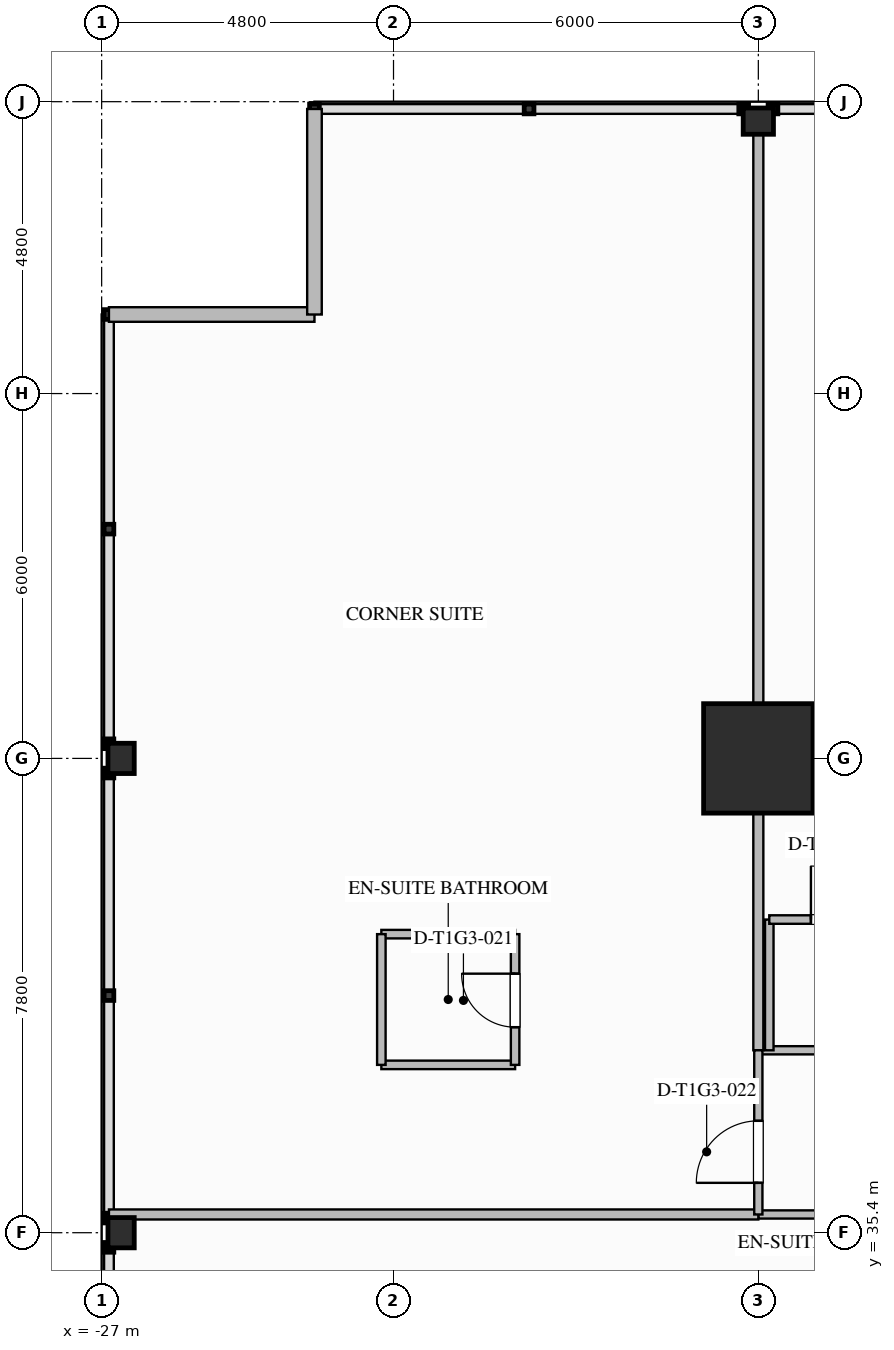
"""IFC4 building model, lengths in metres.
Left out: names, types, materials, properties, quantities, classifications, styles, units other than length and angle.
Written with IfcOpenShell. Run it as: python <this file> out.ifc"""

import sys

from ifc_helpers import new_model, si_unit, direction, frame, frame_2d, origin, origin_2d, place, context, subcontext, project, spatial, rectangle, i_section, extrude, element, fill, save


model = new_model("IFC4")
c1 = context("Model", 3, precision=1e-05, world=origin(), true_north=direction((0.0, 1.0)))
c2 = subcontext(c1, "Body", "Model", "MODEL_VIEW")
j1 = project(units=[si_unit("LENGTHUNIT", "METRE"), si_unit("PLANEANGLEUNIT", "RADIAN")], contexts=[c1])
p1 = place(None, origin())
s1 = spatial("IfcSite", under=j1, at=p1, CompositionType="ELEMENT")
p2 = place(p1, origin())
s2 = spatial("IfcBuilding", under=s1, at=p2, CompositionType="ELEMENT")
p3 = place(p2, frame((0.0, 0.0, 54.2)))
s3 = spatial("IfcBuildingStorey", under=s2, at=p3, CompositionType="ELEMENT", Elevation=54.2)
p4 = place(p3, frame((-16.2, 43.2, 0.0), z_axis=(0.0, 0.0, 1.0), x_axis=(1.0, 0.0, 0.0)))
e1 = element("IfcColumn", 1, at=p4, inside=s3, PredefinedType="COLUMN", context=c2, shape_type="SweptSolid", body=[
    extrude(rectangle(XDim=1.8, YDim=1.8, at=origin_2d()), origin(), (0.0, 0.0, 1.0), 3.5),
])
for number, where, z_axis, x_axis in (
    (2, (-26.68, 35.4, 0.0), (0.0, 0.0, 1.0), (1.0, 0.0, 0.0)),
    (3, (-26.68, 43.2, 0.0), (0.0, 0.0, 1.0), (1.0, 0.0, 0.0)),
    (4, (-16.2, 53.68, 0.0), (0.0, 0.0, 1.0), (0.0, 1.0, 0.0)),
):
    element("IfcColumn", number, at=place(p3, frame(where, z_axis=z_axis, x_axis=x_axis)), inside=s3, PredefinedType="COLUMN", context=c2, shape_type="SweptSolid", body=[
        extrude(i_section(OverallWidth=0.432, OverallDepth=0.498, WebThickness=0.056, FlangeThickness=0.089, FilletRadius=0.03, at=origin_2d()), origin(), (0.0, 0.0, 1.0), 3.497),
    ])
for number, where, z_axis, x_axis in (
    (5, (-26.88, 50.5, 0.0), (0.0, 0.0, 1.0), (1.0, 0.0, 0.0)),
    (6, (-23.5, 50.5, 0.0), (0.0, 0.0, 1.0), (0.0, 1.0, 0.0)),
):
    element("IfcWall", number, at=place(p3, frame(where, z_axis=z_axis, x_axis=x_axis)), inside=s3, PredefinedType="STANDARD", context=c2, shape_type="SweptSolid", body=[
        extrude(rectangle(XDim=3.38, YDim=0.24, at=frame_2d((1.69, 0.0))), origin(), (0.0, 0.0, 1.0), 3.24),
    ])
p5 = place(p3, frame((-16.2, 38.4, 0.0), z_axis=(0.0, 0.0, 1.0), x_axis=(1.0, 0.0, 0.0)))
e7 = element("IfcWall", 7, at=p5, inside=s3, PredefinedType="PARTITIONING", context=c2, shape_type="SweptSolid", body=[
    extrude(rectangle(XDim=32.4, YDim=0.135, at=frame_2d((16.2, 0.0))), origin(), (0.0, 0.0, 1.0), 3.24),
])
p6 = place(p5, frame((4.095, 0.0, 0.0)))
e8 = element("IfcOpeningElement", 8, at=p6, cuts=e7, PredefinedType="OPENING", context=c2, shape_type="SweptSolid", body=[
    extrude(rectangle(XDim=1.26, YDim=2.2, at=frame_2d((0.63, 1.1))), frame((0.0, 0.077, 0.0), z_axis=(0.0, -1.0, 0.0), x_axis=(1.0, 0.0, 0.0)), (0.0, 0.0, 1.0), 0.155),
])
p7 = place(p5, frame((7.875, 0.0, 0.0)))
e9 = element("IfcOpeningElement", 9, at=p7, cuts=e7, PredefinedType="OPENING", context=c2, shape_type="SweptSolid", body=[
    extrude(rectangle(XDim=1.26, YDim=2.2, at=frame_2d((0.63, 1.1))), frame((0.0, 0.077, 0.0), z_axis=(0.0, -1.0, 0.0), x_axis=(1.0, 0.0, 0.0)), (0.0, 0.0, 1.0), 0.155),
])
p8 = place(p5, frame((15.69, 0.0, 0.0)))
e10 = element("IfcOpeningElement", 10, at=p8, cuts=e7, PredefinedType="OPENING", context=c2, shape_type="SweptSolid", body=[
    extrude(rectangle(XDim=1.02, YDim=2.15, at=frame_2d((0.51, 1.075))), frame((0.0, 0.077, 0.0), z_axis=(0.0, -1.0, 0.0), x_axis=(1.0, 0.0, 0.0)), (0.0, 0.0, 1.0), 0.155),
])
p9 = place(p5, frame((21.645, 0.0, 0.0)))
e11 = element("IfcOpeningElement", 11, at=p9, cuts=e7, PredefinedType="OPENING", context=c2, shape_type="SweptSolid", body=[
    extrude(rectangle(XDim=1.26, YDim=2.2, at=frame_2d((0.63, 1.1))), frame((0.0, 0.077, 0.0), z_axis=(0.0, -1.0, 0.0), x_axis=(1.0, 0.0, 0.0)), (0.0, 0.0, 1.0), 0.155),
])
p10 = place(p5, frame((30.285, 0.0, 0.0)))
e12 = element("IfcOpeningElement", 12, at=p10, cuts=e7, PredefinedType="OPENING", context=c2, shape_type="SweptSolid", body=[
    extrude(rectangle(XDim=1.26, YDim=2.2, at=frame_2d((0.63, 1.1))), frame((0.0, 0.077, 0.0), z_axis=(0.0, -1.0, 0.0), x_axis=(1.0, 0.0, 0.0)), (0.0, 0.0, 1.0), 0.155),
])
p11 = place(p3, frame((-16.2, 35.7, 0.0), z_axis=(0.0, 0.0, 1.0), x_axis=(1.0, 0.0, 0.0)))
e13 = element("IfcWall", 13, at=p11, inside=s3, PredefinedType="PARTITIONING", context=c2, shape_type="SweptSolid", body=[
    extrude(rectangle(XDim=5.4, YDim=0.135, at=frame_2d((2.7, 0.0))), origin(), (0.0, 0.0, 1.0), 3.24),
])
p12 = place(p3, frame((-16.2, 38.4, 0.0), z_axis=(0.0, 0.0, 1.0), x_axis=(0.0, 1.0, 0.0)))
e14 = element("IfcWall", 14, at=p12, inside=s3, PredefinedType="PARTITIONING", context=c2, shape_type="SweptSolid", body=[
    extrude(rectangle(XDim=15.48, YDim=0.165, at=frame_2d((7.74, 0.0))), origin(), (0.0, 0.0, 1.0), 2.298),
])
p13 = place(p3, frame((-26.88, 35.7, 0.0), z_axis=(0.0, 0.0, 1.0), x_axis=(1.0, 0.0, 0.0)))
e15 = element("IfcWall", 15, at=p13, inside=s3, PredefinedType="PARTITIONING", context=c2, shape_type="SweptSolid", body=[
    extrude(rectangle(XDim=10.68, YDim=0.165, at=frame_2d((5.34, 0.0))), origin(), (0.0, 0.0, 1.0), 2.298),
])
p14 = place(p3, frame((-16.2, 35.7, 0.0), z_axis=(0.0, 0.0, 1.0), x_axis=(0.0, 1.0, 0.0)))
e16 = element("IfcWall", 16, at=p14, inside=s3, PredefinedType="PARTITIONING", context=c2, shape_type="SweptSolid", body=[
    extrude(rectangle(XDim=2.7, YDim=0.135, at=frame_2d((1.35, 0.0))), origin(), (0.0, 0.0, 1.0), 2.298),
])
p15 = place(p14, frame((0.52, 0.0, 0.0)))
e17 = element("IfcOpeningElement", 17, at=p15, cuts=e16, PredefinedType="OPENING", context=c2, shape_type="SweptSolid", body=[
    extrude(rectangle(XDim=1.02, YDim=2.15, at=frame_2d((0.51, 1.075))), frame((0.0, 0.077, 0.0), z_axis=(0.0, -1.0, 0.0), x_axis=(1.0, 0.0, 0.0)), (0.0, 0.0, 1.0), 0.155),
])
for number, where, z_axis, x_axis in (
    (18, (-22.4, 38.16, 0.0), (0.0, 0.0, 1.0), (1.0, 0.0, 0.0)),
    (19, (-22.4, 40.31, 0.0), (0.0, 0.0, 1.0), (1.0, 0.0, 0.0)),
):
    element("IfcWall", number, at=place(p3, frame(where, z_axis=z_axis, x_axis=x_axis)), inside=s3, PredefinedType="PLUMBINGWALL", context=c2, shape_type="SweptSolid", body=[
        extrude(rectangle(XDim=2.2, YDim=0.14, at=frame_2d((1.1, 0.0))), origin(), (0.0, 0.0, 1.0), 3.24),
    ])
p16 = place(p3, frame((-22.4, 38.16, 0.0), z_axis=(0.0, 0.0, 1.0), x_axis=(0.0, 1.0, 0.0)))
e20 = element("IfcWall", 20, at=p16, inside=s3, PredefinedType="PLUMBINGWALL", context=c2, shape_type="SweptSolid", body=[
    extrude(rectangle(XDim=2.15, YDim=0.14, at=frame_2d((1.075, 0.0))), origin(), (0.0, 0.0, 1.0), 3.24),
])
p17 = place(p3, frame((-20.2, 38.16, 0.0), z_axis=(0.0, 0.0, 1.0), x_axis=(0.0, 1.0, 0.0)))
e21 = element("IfcWall", 21, at=p17, inside=s3, PredefinedType="PLUMBINGWALL", context=c2, shape_type="SweptSolid", body=[
    extrude(rectangle(XDim=2.15, YDim=0.14, at=frame_2d((1.075, 0.0))), origin(), (0.0, 0.0, 1.0), 3.24),
])
p18 = place(p17, frame((0.62, 0.0, 0.0)))
e22 = element("IfcOpeningElement", 22, at=p18, cuts=e21, PredefinedType="OPENING", context=c2, shape_type="SweptSolid", body=[
    extrude(rectangle(XDim=0.88, YDim=2.1, at=frame_2d((0.44, 1.05))), frame((0.0, 0.08, 0.0), z_axis=(0.0, -1.0, 0.0), x_axis=(1.0, 0.0, 0.0)), (0.0, 0.0, 1.0), 0.16),
])
p19 = place(p3, frame((-16.02, 38.4, 0.0), z_axis=(0.0, 0.0, 1.0), x_axis=(0.0, 1.0, 0.0)))
e23 = element("IfcWall", 23, at=p19, inside=s3, PredefinedType="PLUMBINGWALL", context=c2, shape_type="SweptSolid", body=[
    extrude(rectangle(XDim=2.15, YDim=0.14, at=frame_2d((1.075, 0.0))), origin(), (0.0, 0.0, 1.0), 2.298),
])
p20 = place(p3, frame((-16.02, 40.55, 0.0), z_axis=(0.0, 0.0, 1.0), x_axis=(1.0, 0.0, 0.0)))
e24 = element("IfcWall", 24, at=p20, inside=s3, PredefinedType="PLUMBINGWALL", context=c2, shape_type="SweptSolid", body=[
    extrude(rectangle(XDim=2.25, YDim=0.14, at=frame_2d((1.125, 0.0))), origin(), (0.0, 0.0, 1.0), 3.24),
])
p21 = place(p20, frame((0.685, 0.0, 0.0)))
e25 = element("IfcOpeningElement", 25, at=p21, cuts=e24, PredefinedType="OPENING", context=c2, shape_type="SweptSolid", body=[
    extrude(rectangle(XDim=0.88, YDim=2.1, at=frame_2d((0.44, 1.05))), frame((0.0, 0.08, 0.0), z_axis=(0.0, -1.0, 0.0), x_axis=(1.0, 0.0, 0.0)), (0.0, 0.0, 1.0), 0.16),
])
p22 = place(p18, origin())
e26 = element("IfcDoor", 26, at=p22, inside=s3, OperationType="SINGLE_SWING_RIGHT", PredefinedType="DOOR", context=c2, shape_type="SweptSolid", body=[
    extrude(rectangle(XDim=0.88, YDim=2.1, at=frame_2d((0.44, 1.05))), frame((0.0, 0.025, 0.0), z_axis=(0.0, -1.0, 0.0), x_axis=(1.0, 0.0, 0.0)), (0.0, 0.0, 1.0), 0.05),
])
fill(e22, e26)
p23 = place(p15, origin())
e27 = element("IfcDoor", 27, at=p23, inside=s3, OperationType="SINGLE_SWING_LEFT", PredefinedType="DOOR", context=c2, shape_type="SweptSolid", body=[
    extrude(rectangle(XDim=1.02, YDim=2.15, at=frame_2d((0.51, 1.075))), frame((0.0, 0.025, 0.0), z_axis=(0.0, -1.0, 0.0), x_axis=(1.0, 0.0, 0.0)), (0.0, 0.0, 1.0), 0.05),
])
fill(e17, e27)
p24 = place(p21, origin())
e28 = element("IfcDoor", 28, at=p24, inside=s3, OperationType="SINGLE_SWING_LEFT", PredefinedType="DOOR", context=c2, shape_type="SweptSolid", body=[
    extrude(rectangle(XDim=0.88, YDim=2.1, at=frame_2d((0.44, 1.05))), frame((0.0, 0.025, 0.0), z_axis=(0.0, -1.0, 0.0), x_axis=(1.0, 0.0, 0.0)), (0.0, 0.0, 1.0), 0.05),
])
fill(e25, e28)
save(model, sys.argv[1])
